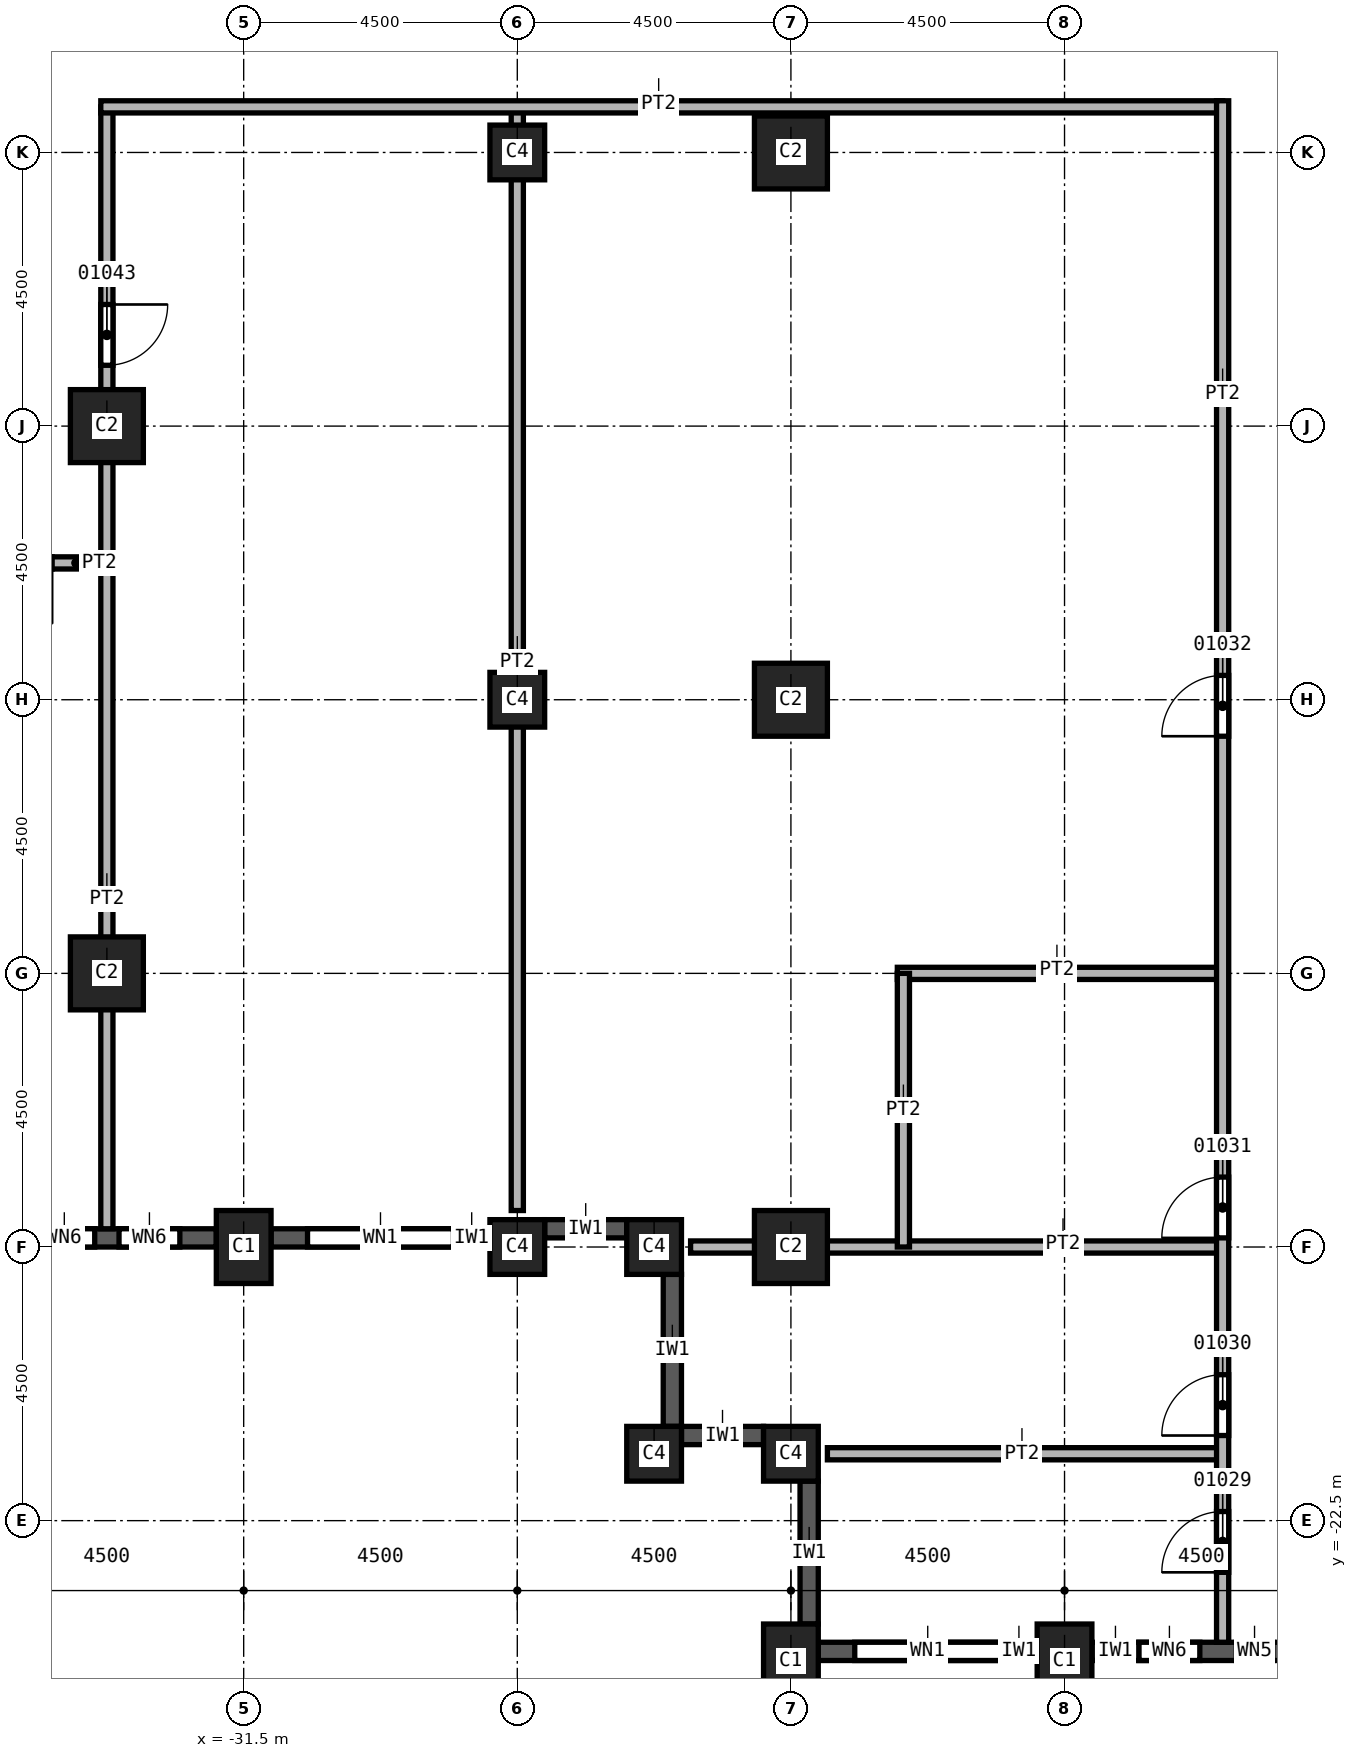
"""IFC4 building model, lengths in metres.
Left out: names, types, materials, properties, quantities, classifications, styles, units other than length and angle.
Written with IfcOpenShell. Run it as: python <this file> out.ifc"""

import sys

from ifc_helpers import new_model, si_unit, direction, frame, frame_2d, origin, origin_2d, place, context, subcontext, project, spatial, rectangle, extrude, element, fill, save


model = new_model("IFC4")
c1 = context("Model", 3, precision=1e-05, world=origin(), true_north=direction((0.0, 1.0)))
c2 = subcontext(c1, "Body", "Model", "MODEL_VIEW")
j1 = project(units=[si_unit("LENGTHUNIT", "METRE"), si_unit("PLANEANGLEUNIT", "RADIAN")], contexts=[c1])
p1 = place(None, origin())
s1 = spatial("IfcSite", under=j1, at=p1, CompositionType="ELEMENT")
p2 = place(p1, origin())
s2 = spatial("IfcBuilding", under=s1, at=p2, CompositionType="ELEMENT")
p3 = place(p2, frame((0.0, 0.0, 72.0)))
s3 = spatial("IfcBuildingStorey", under=s2, at=p3, CompositionType="ELEMENT", Elevation=72.0)
p4 = place(p3, frame((-31.5, -18.0, 0.0), z_axis=(0.0, 0.0, 1.0), x_axis=(1.0, 0.0, 0.0)))
e1 = element("IfcColumn", 1, at=p4, inside=s3, PredefinedType="COLUMN", context=c2, shape_type="SweptSolid", body=[
    extrude(rectangle(XDim=0.9, YDim=1.2, at=origin_2d()), origin(), (0.0, 0.0, 1.0), 3.7),
])
for number, where, z_axis, x_axis in (
    (2, (-33.75, -4.5, 0.0), (0.0, 0.0, 1.0), (1.0, 0.0, 0.0)),
    (3, (-33.75, -13.5, 0.0), (0.0, 0.0, 1.0), (1.0, 0.0, 0.0)),
    (4, (-22.5, 0.0, 0.0), (0.0, 0.0, 1.0), (1.0, 0.0, 0.0)),
    (5, (-22.5, -9.0, 0.0), (0.0, 0.0, 1.0), (1.0, 0.0, 0.0)),
    (6, (-22.5, -18.0, 0.0), (0.0, 0.0, 1.0), (1.0, 0.0, 0.0)),
):
    element("IfcColumn", number, at=place(p3, frame(where, z_axis=z_axis, x_axis=x_axis)), inside=s3, PredefinedType="COLUMN", context=c2, shape_type="SweptSolid", body=[
        extrude(rectangle(XDim=1.2, YDim=1.2, at=origin_2d()), origin(), (0.0, 0.0, 1.0), 3.7),
    ])
for number, where, z_axis, x_axis in (
    (7, (-18.0, -24.8, 0.0), (0.0, 0.0, 1.0), (1.0, 0.0, 0.0)),
    (8, (-22.5, -24.8, 0.0), (0.0, 0.0, 1.0), (1.0, 0.0, 0.0)),
):
    element("IfcColumn", number, at=place(p3, frame(where, z_axis=z_axis, x_axis=x_axis)), inside=s3, PredefinedType="COLUMN", context=c2, shape_type="SweptSolid", body=[
        extrude(rectangle(XDim=0.9, YDim=1.2, at=origin_2d()), origin(), (0.0, 0.0, 1.0), 3.7),
    ])
for number, where, z_axis, x_axis in (
    (9, (-27.0, 0.0, 0.0), (0.0, 0.0, 1.0), (1.0, 0.0, 0.0)),
    (10, (-27.0, -9.0, 0.0), (0.0, 0.0, 1.0), (1.0, 0.0, 0.0)),
    (11, (-27.0, -18.0, 0.0), (0.0, 0.0, 1.0), (1.0, 0.0, 0.0)),
    (12, (-22.5, -21.4, 0.0), (0.0, 0.0, 1.0), (1.0, 0.0, 0.0)),
    (13, (-24.75, -21.4, 0.0), (0.0, 0.0, 1.0), (1.0, 0.0, 0.0)),
    (14, (-24.75, -18.0, 0.0), (0.0, 0.0, 1.0), (1.0, 0.0, 0.0)),
):
    element("IfcColumn", number, at=place(p3, frame(where, z_axis=z_axis, x_axis=x_axis)), inside=s3, PredefinedType="COLUMN", context=c2, shape_type="SweptSolid", body=[
        extrude(rectangle(XDim=0.9, YDim=0.9, at=origin_2d()), origin(), (0.0, 0.0, 1.0), 3.7),
    ])
p5 = place(p3, frame((-35.55, -17.85, 0.0), z_axis=(0.0, 0.0, 1.0), x_axis=(1.0, 0.0, 0.0)))
e15 = element("IfcWall", 15, at=p5, inside=s3, PredefinedType="SOLIDWALL", context=c2, shape_type="SweptSolid", body=[
    extrude(rectangle(XDim=3.6, YDim=0.3, at=frame_2d((1.8, 0.0))), origin(), (0.0, 0.0, 1.0), 3.1),
])
p6 = place(p5, frame((0.6, 0.0, 0.8)))
e16 = element("IfcOpeningElement", 16, at=p6, cuts=e15, PredefinedType="OPENING", context=c2, shape_type="SweptSolid", body=[
    extrude(rectangle(XDim=1.0, YDim=1.95, at=frame_2d((0.5, 0.975))), frame((0.0, 0.15, 0.0), z_axis=(0.0, -1.0, 0.0), x_axis=(1.0, 0.0, 0.0)), (0.0, 0.0, 1.0), 0.3),
])
p7 = place(p5, frame((2.0, 0.0, 0.8)))
e17 = element("IfcOpeningElement", 17, at=p7, cuts=e15, PredefinedType="OPENING", context=c2, shape_type="SweptSolid", body=[
    extrude(rectangle(XDim=1.0, YDim=1.95, at=frame_2d((0.5, 0.975))), frame((0.0, 0.15, 0.0), z_axis=(0.0, -1.0, 0.0), x_axis=(1.0, 0.0, 0.0)), (0.0, 0.0, 1.0), 0.3),
])
p8 = place(p3, frame((-31.05, -17.85, 0.0), z_axis=(0.0, 0.0, 1.0), x_axis=(1.0, 0.0, 0.0)))
e18 = element("IfcWall", 18, at=p8, inside=s3, PredefinedType="SOLIDWALL", context=c2, shape_type="SweptSolid", body=[
    extrude(rectangle(XDim=3.6, YDim=0.3, at=frame_2d((1.8, 0.0))), origin(), (0.0, 0.0, 1.0), 3.1),
])
p9 = place(p8, frame((0.6, 0.0, 0.8)))
e19 = element("IfcOpeningElement", 19, at=p9, cuts=e18, PredefinedType="OPENING", context=c2, shape_type="SweptSolid", body=[
    extrude(rectangle(XDim=2.4, YDim=1.95, at=frame_2d((1.2, 0.975))), frame((0.0, 0.15, 0.0), z_axis=(0.0, -1.0, 0.0), x_axis=(1.0, 0.0, 0.0)), (0.0, 0.0, 1.0), 0.3),
])
p10 = place(p3, frame((-26.55, -17.7, 0.0), z_axis=(0.0, 0.0, 1.0), x_axis=(1.0, 0.0, 0.0)))
e20 = element("IfcWall", 20, at=p10, inside=s3, PredefinedType="SOLIDWALL", context=c2, shape_type="SweptSolid", body=[
    extrude(rectangle(XDim=1.35, YDim=0.3, at=frame_2d((0.675, 0.0))), origin(), (0.0, 0.0, 1.0), 3.1),
])
p11 = place(p3, frame((-24.45, -18.45, 0.0), z_axis=(0.0, 0.0, 1.0), x_axis=(0.0, -1.0, 0.0)))
e21 = element("IfcWall", 21, at=p11, inside=s3, PredefinedType="SOLIDWALL", context=c2, shape_type="SweptSolid", body=[
    extrude(rectangle(XDim=2.5, YDim=0.3, at=frame_2d((1.25, 0.0))), origin(), (0.0, 0.0, 1.0), 3.1),
])
p12 = place(p3, frame((-24.3, -21.1, 0.0), z_axis=(0.0, 0.0, 1.0), x_axis=(1.0, 0.0, 0.0)))
e22 = element("IfcWall", 22, at=p12, inside=s3, PredefinedType="SOLIDWALL", context=c2, shape_type="SweptSolid", body=[
    extrude(rectangle(XDim=1.35, YDim=0.3, at=frame_2d((0.675, 0.0))), origin(), (0.0, 0.0, 1.0), 3.1),
])
p13 = place(p3, frame((-22.2, -21.85, 0.0), z_axis=(0.0, 0.0, 1.0), x_axis=(0.0, -1.0, 0.0)))
e23 = element("IfcWall", 23, at=p13, inside=s3, PredefinedType="SOLIDWALL", context=c2, shape_type="SweptSolid", body=[
    extrude(rectangle(XDim=2.35, YDim=0.3, at=frame_2d((1.175, 0.0))), origin(), (0.0, 0.0, 1.0), 3.1),
])
p14 = place(p3, frame((-22.05, -24.65, 0.0), z_axis=(0.0, 0.0, 1.0), x_axis=(1.0, 0.0, 0.0)))
e24 = element("IfcWall", 24, at=p14, inside=s3, PredefinedType="SOLIDWALL", context=c2, shape_type="SweptSolid", body=[
    extrude(rectangle(XDim=3.6, YDim=0.3, at=frame_2d((1.8, 0.0))), origin(), (0.0, 0.0, 1.0), 3.1),
])
p15 = place(p14, frame((0.6, 0.0, 0.8)))
e25 = element("IfcOpeningElement", 25, at=p15, cuts=e24, PredefinedType="OPENING", context=c2, shape_type="SweptSolid", body=[
    extrude(rectangle(XDim=2.4, YDim=1.95, at=frame_2d((1.2, 0.975))), frame((0.0, 0.15, 0.0), z_axis=(0.0, -1.0, 0.0), x_axis=(1.0, 0.0, 0.0)), (0.0, 0.0, 1.0), 0.3),
])
p16 = place(p3, frame((-17.55, -24.65, 0.0), z_axis=(0.0, 0.0, 1.0), x_axis=(1.0, 0.0, 0.0)))
e26 = element("IfcWall", 26, at=p16, inside=s3, PredefinedType="SOLIDWALL", context=c2, shape_type="SweptSolid", body=[
    extrude(rectangle(XDim=3.6, YDim=0.3, at=frame_2d((1.8, 0.0))), origin(), (0.0, 0.0, 1.0), 3.1),
])
p17 = place(p16, frame((0.775, 0.0, 0.8)))
e27 = element("IfcOpeningElement", 27, at=p17, cuts=e26, PredefinedType="OPENING", context=c2, shape_type="SweptSolid", body=[
    extrude(rectangle(XDim=1.0, YDim=1.95, at=frame_2d((0.5, 0.975))), frame((0.0, 0.15, 0.0), z_axis=(0.0, -1.0, 0.0), x_axis=(1.0, 0.0, 0.0)), (0.0, 0.0, 1.0), 0.3),
])
p18 = place(p16, frame((2.375, 0.0, 0.8)))
e28 = element("IfcOpeningElement", 28, at=p18, cuts=e26, PredefinedType="OPENING", context=c2, shape_type="SweptSolid", body=[
    extrude(rectangle(XDim=0.6, YDim=1.95, at=frame_2d((0.3, 0.975))), frame((0.0, 0.15, 0.0), z_axis=(0.0, -1.0, 0.0), x_axis=(1.0, 0.0, 0.0)), (0.0, 0.0, 1.0), 0.3),
])
p19 = place(p3, frame((-33.75, 0.75, 0.0), z_axis=(0.0, 0.0, 1.0), x_axis=(0.0, -1.0, 0.0)))
e29 = element("IfcWall", 29, at=p19, inside=s3, PredefinedType="PARTITIONING", context=c2, shape_type="SweptSolid", body=[
    extrude(rectangle(XDim=18.45, YDim=0.2, at=frame_2d((9.225, 0.0))), origin(), (0.0, 0.0, 1.0), 3.7),
])
p20 = place(p19, frame((3.25, 0.0, 0.0)))
e30 = element("IfcOpeningElement", 30, at=p20, cuts=e29, PredefinedType="OPENING", context=c2, shape_type="SweptSolid", body=[
    extrude(rectangle(XDim=1.0, YDim=2.1, at=frame_2d((0.5, 1.05))), frame((0.0, 0.1, 0.0), z_axis=(0.0, -1.0, 0.0), x_axis=(1.0, 0.0, 0.0)), (0.0, 0.0, 1.0), 0.2),
])
p21 = place(p3, frame((-33.65, -6.75, 0.0), z_axis=(0.0, 0.0, 1.0), x_axis=(-1.0, 0.0, 0.0)))
e31 = element("IfcWall", 31, at=p21, inside=s3, PredefinedType="PARTITIONING", context=c2, shape_type="SweptSolid", body=[
    extrude(rectangle(XDim=2.35, YDim=0.2, at=frame_2d((1.175, 0.0))), origin(), (0.0, 0.0, 1.0), 3.7),
])
p22 = place(p21, frame((1.0, 0.0, 0.0)))
e32 = element("IfcOpeningElement", 32, at=p22, cuts=e31, PredefinedType="OPENING", context=c2, shape_type="SweptSolid", body=[
    extrude(rectangle(XDim=1.0, YDim=2.1, at=frame_2d((0.5, 1.05))), frame((0.0, 0.1, 0.0), z_axis=(0.0, -1.0, 0.0), x_axis=(1.0, 0.0, 0.0)), (0.0, 0.0, 1.0), 0.2),
])
p23 = place(p3, frame((-27.0, -17.4, 0.0), z_axis=(0.0, 0.0, 1.0), x_axis=(0.0, 1.0, 0.0)))
e33 = element("IfcWall", 33, at=p23, inside=s3, PredefinedType="PARTITIONING", context=c2, shape_type="SweptSolid", body=[
    extrude(rectangle(XDim=18.15, YDim=0.2, at=frame_2d((9.075, 0.0))), origin(), (0.0, 0.0, 1.0), 3.7),
])
p24 = place(p3, frame((-15.4, 0.75, 0.0), z_axis=(0.0, 0.0, 1.0), x_axis=(-1.0, 0.0, 0.0)))
e34 = element("IfcWall", 34, at=p24, inside=s3, PredefinedType="PARTITIONING", context=c2, shape_type="SweptSolid", body=[
    extrude(rectangle(XDim=18.45, YDim=0.2, at=frame_2d((9.225, 0.0))), origin(), (0.0, 0.0, 1.0), 3.7),
])
p25 = place(p3, frame((-24.15, -18.0, 0.0), z_axis=(0.0, 0.0, 1.0), x_axis=(1.0, 0.0, 0.0)))
e35 = element("IfcWall", 35, at=p25, inside=s3, PredefinedType="PARTITIONING", context=c2, shape_type="SweptSolid", body=[
    extrude(rectangle(XDim=8.75, YDim=0.2, at=frame_2d((4.375, 0.0))), origin(), (0.0, 0.0, 1.0), 3.7),
])
p26 = place(p3, frame((-21.9, -21.4, 0.0), z_axis=(0.0, 0.0, 1.0), x_axis=(1.0, 0.0, 0.0)))
e36 = element("IfcWall", 36, at=p26, inside=s3, PredefinedType="PARTITIONING", context=c2, shape_type="SweptSolid", body=[
    extrude(rectangle(XDim=6.5, YDim=0.2, at=frame_2d((3.25, 0.0))), origin(), (0.0, 0.0, 1.0), 3.7),
])
p27 = place(p3, frame((-20.75, -13.5, 0.0), z_axis=(0.0, 0.0, 1.0), x_axis=(1.0, 0.0, 0.0)))
e37 = element("IfcWall", 37, at=p27, inside=s3, PredefinedType="PARTITIONING", context=c2, shape_type="SweptSolid", body=[
    extrude(rectangle(XDim=5.35, YDim=0.2, at=frame_2d((2.675, 0.0))), origin(), (0.0, 0.0, 1.0), 3.7),
])
p28 = place(p3, frame((-20.65, -18.0, 0.0), z_axis=(0.0, 0.0, 1.0), x_axis=(0.0, 1.0, 0.0)))
e38 = element("IfcWall", 38, at=p28, inside=s3, PredefinedType="PARTITIONING", context=c2, shape_type="SweptSolid", body=[
    extrude(rectangle(XDim=4.5, YDim=0.2, at=frame_2d((2.25, 0.0))), origin(), (0.0, 0.0, 1.0), 3.7),
])
p29 = place(p3, frame((-15.4, -24.5, 0.0), z_axis=(0.0, 0.0, 1.0), x_axis=(0.0, 1.0, 0.0)))
e39 = element("IfcWall", 39, at=p29, inside=s3, PredefinedType="PARTITIONING", context=c2, shape_type="SweptSolid", body=[
    extrude(rectangle(XDim=25.35, YDim=0.2, at=frame_2d((12.675, 0.0))), origin(), (0.0, 0.0, 1.0), 3.7),
])
p30 = place(p29, frame((1.15, 0.0, 0.0)))
e40 = element("IfcOpeningElement", 40, at=p30, cuts=e39, PredefinedType="OPENING", context=c2, shape_type="SweptSolid", body=[
    extrude(rectangle(XDim=1.0, YDim=2.1, at=frame_2d((0.5, 1.05))), frame((0.0, 0.1, 0.0), z_axis=(0.0, -1.0, 0.0), x_axis=(1.0, 0.0, 0.0)), (0.0, 0.0, 1.0), 0.2),
])
p31 = place(p29, frame((3.4, 0.0, 0.0)))
e41 = element("IfcOpeningElement", 41, at=p31, cuts=e39, PredefinedType="OPENING", context=c2, shape_type="SweptSolid", body=[
    extrude(rectangle(XDim=1.0, YDim=2.1, at=frame_2d((0.5, 1.05))), frame((0.0, 0.1, 0.0), z_axis=(0.0, -1.0, 0.0), x_axis=(1.0, 0.0, 0.0)), (0.0, 0.0, 1.0), 0.2),
])
p32 = place(p29, frame((6.65, 0.0, 0.0)))
e42 = element("IfcOpeningElement", 42, at=p32, cuts=e39, PredefinedType="OPENING", context=c2, shape_type="SweptSolid", body=[
    extrude(rectangle(XDim=1.0, YDim=2.1, at=frame_2d((0.5, 1.05))), frame((0.0, 0.1, 0.0), z_axis=(0.0, -1.0, 0.0), x_axis=(1.0, 0.0, 0.0)), (0.0, 0.0, 1.0), 0.2),
])
p33 = place(p29, frame((14.9, 0.0, 0.0)))
e43 = element("IfcOpeningElement", 43, at=p33, cuts=e39, PredefinedType="OPENING", context=c2, shape_type="SweptSolid", body=[
    extrude(rectangle(XDim=1.0, YDim=2.1, at=frame_2d((0.5, 1.05))), frame((0.0, 0.1, 0.0), z_axis=(0.0, -1.0, 0.0), x_axis=(1.0, 0.0, 0.0)), (0.0, 0.0, 1.0), 0.2),
])
p34 = place(p9, origin())
e44 = element("IfcWindow", 44, at=p34, inside=s3, PartitioningType="SINGLE_PANEL", PredefinedType="WINDOW", context=c2, shape_type="SweptSolid", body=[
    extrude(rectangle(XDim=2.4, YDim=1.95, at=frame_2d((1.2, 0.975))), frame((0.0, 0.03, 0.0), z_axis=(0.0, -1.0, 0.0), x_axis=(1.0, 0.0, 0.0)), (0.0, 0.0, 1.0), 0.06),
])
fill(e19, e44)
p35 = place(p15, origin())
e45 = element("IfcWindow", 45, at=p35, inside=s3, PartitioningType="SINGLE_PANEL", PredefinedType="WINDOW", context=c2, shape_type="SweptSolid", body=[
    extrude(rectangle(XDim=2.4, YDim=1.95, at=frame_2d((1.2, 0.975))), frame((0.0, 0.03, 0.0), z_axis=(0.0, -1.0, 0.0), x_axis=(1.0, 0.0, 0.0)), (0.0, 0.0, 1.0), 0.06),
])
fill(e25, e45)
p36 = place(p30, origin())
e46 = element("IfcDoor", 46, at=p36, inside=s3, OperationType="SINGLE_SWING_RIGHT", PredefinedType="DOOR", context=c2, shape_type="SweptSolid", body=[
    extrude(rectangle(XDim=1.0, YDim=2.1, at=frame_2d((0.5, 1.05))), frame((0.0, 0.025, 0.0), z_axis=(0.0, -1.0, 0.0), x_axis=(1.0, 0.0, 0.0)), (0.0, 0.0, 1.0), 0.05),
])
fill(e40, e46)
p37 = place(p31, origin())
e47 = element("IfcDoor", 47, at=p37, inside=s3, OperationType="SINGLE_SWING_LEFT", PredefinedType="DOOR", context=c2, shape_type="SweptSolid", body=[
    extrude(rectangle(XDim=1.0, YDim=2.1, at=frame_2d((0.5, 1.05))), frame((0.0, 0.025, 0.0), z_axis=(0.0, -1.0, 0.0), x_axis=(1.0, 0.0, 0.0)), (0.0, 0.0, 1.0), 0.05),
])
fill(e41, e47)
p38 = place(p32, origin())
e48 = element("IfcDoor", 48, at=p38, inside=s3, OperationType="SINGLE_SWING_RIGHT", PredefinedType="DOOR", context=c2, shape_type="SweptSolid", body=[
    extrude(rectangle(XDim=1.0, YDim=2.1, at=frame_2d((0.5, 1.05))), frame((0.0, 0.025, 0.0), z_axis=(0.0, -1.0, 0.0), x_axis=(1.0, 0.0, 0.0)), (0.0, 0.0, 1.0), 0.05),
])
fill(e42, e48)
p39 = place(p33, origin())
e49 = element("IfcDoor", 49, at=p39, inside=s3, OperationType="SINGLE_SWING_LEFT", PredefinedType="DOOR", context=c2, shape_type="SweptSolid", body=[
    extrude(rectangle(XDim=1.0, YDim=2.1, at=frame_2d((0.5, 1.05))), frame((0.0, 0.025, 0.0), z_axis=(0.0, -1.0, 0.0), x_axis=(1.0, 0.0, 0.0)), (0.0, 0.0, 1.0), 0.05),
])
fill(e43, e49)
p40 = place(p20, origin())
e50 = element("IfcDoor", 50, at=p40, inside=s3, OperationType="SINGLE_SWING_RIGHT", PredefinedType="DOOR", context=c2, shape_type="SweptSolid", body=[
    extrude(rectangle(XDim=1.0, YDim=2.1, at=frame_2d((0.5, 1.05))), frame((0.0, 0.025, 0.0), z_axis=(0.0, -1.0, 0.0), x_axis=(1.0, 0.0, 0.0)), (0.0, 0.0, 1.0), 0.05),
])
fill(e30, e50)
p41 = place(p6, origin())
e51 = element("IfcWindow", 51, at=p41, inside=s3, PartitioningType="SINGLE_PANEL", PredefinedType="WINDOW", context=c2, shape_type="SweptSolid", body=[
    extrude(rectangle(XDim=1.0, YDim=1.95, at=frame_2d((0.5, 0.975))), frame((0.0, 0.03, 0.0), z_axis=(0.0, -1.0, 0.0), x_axis=(1.0, 0.0, 0.0)), (0.0, 0.0, 1.0), 0.06),
])
fill(e16, e51)
p42 = place(p7, origin())
e52 = element("IfcWindow", 52, at=p42, inside=s3, PartitioningType="SINGLE_PANEL", PredefinedType="WINDOW", context=c2, shape_type="SweptSolid", body=[
    extrude(rectangle(XDim=1.0, YDim=1.95, at=frame_2d((0.5, 0.975))), frame((0.0, 0.03, 0.0), z_axis=(0.0, -1.0, 0.0), x_axis=(1.0, 0.0, 0.0)), (0.0, 0.0, 1.0), 0.06),
])
fill(e17, e52)
p43 = place(p17, origin())
e53 = element("IfcWindow", 53, at=p43, inside=s3, PartitioningType="SINGLE_PANEL", PredefinedType="WINDOW", context=c2, shape_type="SweptSolid", body=[
    extrude(rectangle(XDim=1.0, YDim=1.95, at=frame_2d((0.5, 0.975))), frame((0.0, 0.03, 0.0), z_axis=(0.0, -1.0, 0.0), x_axis=(1.0, 0.0, 0.0)), (0.0, 0.0, 1.0), 0.06),
])
fill(e27, e53)
p44 = place(p18, origin())
e54 = element("IfcWindow", 54, at=p44, inside=s3, PartitioningType="SINGLE_PANEL", PredefinedType="WINDOW", context=c2, shape_type="SweptSolid", body=[
    extrude(rectangle(XDim=0.6, YDim=1.95, at=frame_2d((0.3, 0.975))), frame((0.0, 0.03, 0.0), z_axis=(0.0, -1.0, 0.0), x_axis=(1.0, 0.0, 0.0)), (0.0, 0.0, 1.0), 0.06),
])
fill(e28, e54)
save(model, sys.argv[1])
